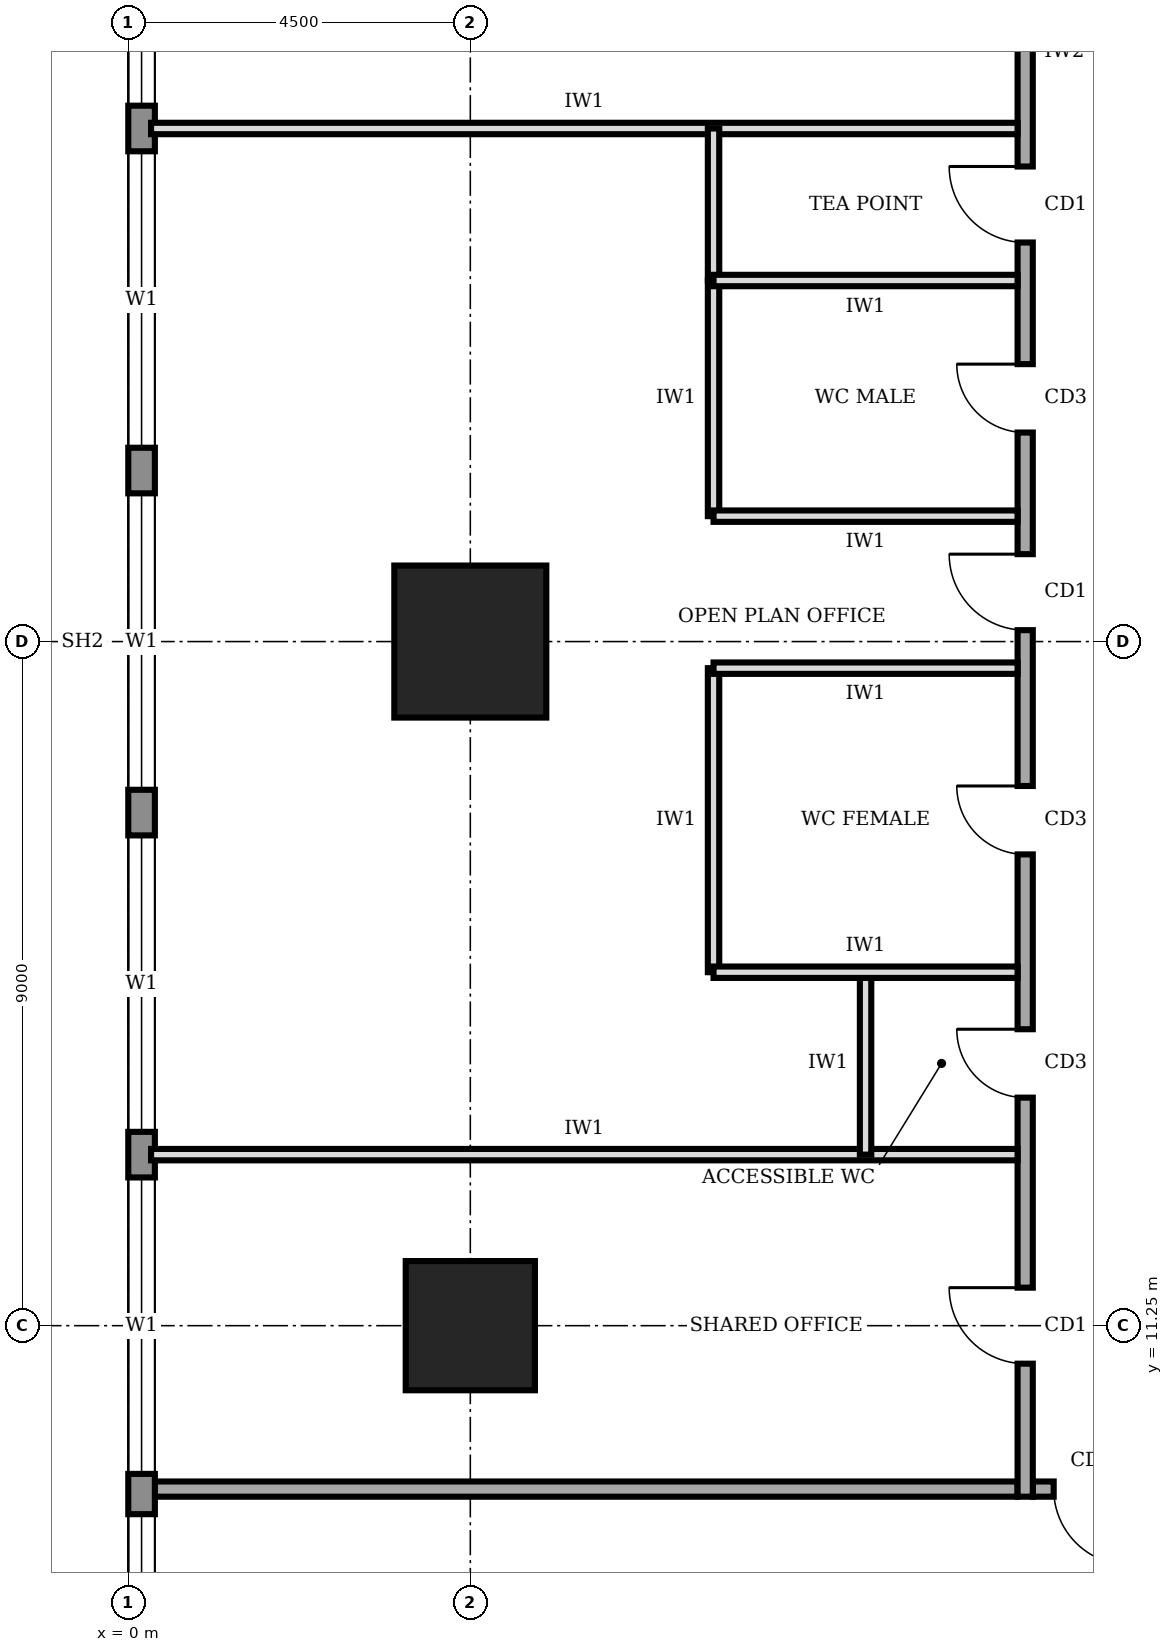
"""IFC4 building model, lengths in metres.
Left out: names, types, materials, properties, quantities, classifications, styles, units other than length and angle.
Written with IfcOpenShell. Run it as: python <this file> out.ifc"""

import sys

from ifc_helpers import new_model, si_unit, direction, frame, frame_2d, origin, origin_2d, place, context, subcontext, project, spatial, rectangle, extrude, element, fill, save


model = new_model("IFC4")
c1 = context("Model", 3, precision=1e-05, world=origin(), true_north=direction((0.0, 1.0)))
c2 = subcontext(c1, "Body", "Model", "MODEL_VIEW")
j1 = project(units=[si_unit("LENGTHUNIT", "METRE"), si_unit("PLANEANGLEUNIT", "RADIAN")], contexts=[c1])
p1 = place(None, origin())
s1 = spatial("IfcSite", under=j1, at=p1, CompositionType="ELEMENT")
p2 = place(p1, origin())
s2 = spatial("IfcBuilding", under=s1, at=p2, CompositionType="ELEMENT")
p3 = place(p2, frame((0.0, 0.0, 277.0)))
s3 = spatial("IfcBuildingStorey", under=s2, at=p3, CompositionType="ELEMENT", Elevation=277.0)
p4 = place(p3, frame((4.5, 11.25, 0.0), z_axis=(0.0, 0.0, 1.0), x_axis=(1.0, 0.0, 0.0)))
e1 = element("IfcColumn", 1, at=p4, inside=s3, PredefinedType="COLUMN", context=c2, shape_type="SweptSolid", body=[
    extrude(rectangle(XDim=1.7, YDim=1.7, at=origin_2d()), origin(), (0.0, 0.0, 1.0), 4.0),
])
p5 = place(p3, frame((4.5, 20.25, 0.0), z_axis=(0.0, 0.0, 1.0), x_axis=(1.0, 0.0, 0.0)))
e2 = element("IfcColumn", 2, at=p5, inside=s3, PredefinedType="COLUMN", context=c2, shape_type="SweptSolid", body=[
    extrude(rectangle(XDim=2.0, YDim=2.0, at=origin_2d()), origin(), (0.0, 0.0, 1.0), 4.0),
])
p6 = place(p3, frame((0.175, 35.98, 0.0), z_axis=(0.0, 0.0, 1.0), x_axis=(0.0, -1.0, 0.0)))
e3 = element("IfcWall", 3, at=p6, inside=s3, PredefinedType="STANDARD", context=c2, shape_type="SweptSolid", body=[
    extrude(rectangle(XDim=31.46, YDim=0.35, at=frame_2d((15.73, 0.0))), origin(), (0.0, 0.0, 1.0), 3.75),
])
p7 = place(p6, frame((27.21, 0.0, 0.9)))
e4 = element("IfcOpeningElement", 4, at=p7, cuts=e3, PredefinedType="OPENING", context=c2, shape_type="SweptSolid", body=[
    extrude(rectangle(XDim=3.9, YDim=2.2, at=frame_2d((1.95, 1.1))), frame((0.0, 0.185, 0.0), z_axis=(0.0, -1.0, 0.0), x_axis=(1.0, 0.0, 0.0)), (0.0, 0.0, 1.0), 0.37),
])
p8 = place(p6, frame((22.78, 0.0, 0.9)))
e5 = element("IfcOpeningElement", 5, at=p8, cuts=e3, PredefinedType="OPENING", context=c2, shape_type="SweptSolid", body=[
    extrude(rectangle(XDim=3.9, YDim=2.2, at=frame_2d((1.95, 1.1))), frame((0.0, 0.185, 0.0), z_axis=(0.0, -1.0, 0.0), x_axis=(1.0, 0.0, 0.0)), (0.0, 0.0, 1.0), 0.37),
])
p9 = place(p6, frame((18.28, 0.0, 0.9)))
e6 = element("IfcOpeningElement", 6, at=p9, cuts=e3, PredefinedType="OPENING", context=c2, shape_type="SweptSolid", body=[
    extrude(rectangle(XDim=3.9, YDim=2.2, at=frame_2d((1.95, 1.1))), frame((0.0, 0.185, 0.0), z_axis=(0.0, -1.0, 0.0), x_axis=(1.0, 0.0, 0.0)), (0.0, 0.0, 1.0), 0.37),
])
p10 = place(p6, frame((13.78, 0.0, 0.9)))
e7 = element("IfcOpeningElement", 7, at=p10, cuts=e3, PredefinedType="OPENING", context=c2, shape_type="SweptSolid", body=[
    extrude(rectangle(XDim=3.9, YDim=2.2, at=frame_2d((1.95, 1.1))), frame((0.0, 0.185, 0.0), z_axis=(0.0, -1.0, 0.0), x_axis=(1.0, 0.0, 0.0)), (0.0, 0.0, 1.0), 0.37),
])
p11 = place(p6, frame((9.28, 0.0, 0.9)))
e8 = element("IfcOpeningElement", 8, at=p11, cuts=e3, PredefinedType="OPENING", context=c2, shape_type="SweptSolid", body=[
    extrude(rectangle(XDim=3.9, YDim=2.2, at=frame_2d((1.95, 1.1))), frame((0.0, 0.185, 0.0), z_axis=(0.0, -1.0, 0.0), x_axis=(1.0, 0.0, 0.0)), (0.0, 0.0, 1.0), 0.37),
])
p12 = place(p6, frame((4.78, 0.0, 0.9)))
e9 = element("IfcOpeningElement", 9, at=p12, cuts=e3, PredefinedType="OPENING", context=c2, shape_type="SweptSolid", body=[
    extrude(rectangle(XDim=3.9, YDim=2.2, at=frame_2d((1.95, 1.1))), frame((0.0, 0.185, 0.0), z_axis=(0.0, -1.0, 0.0), x_axis=(1.0, 0.0, 0.0)), (0.0, 0.0, 1.0), 0.37),
])
p13 = place(p3, frame((11.9, 9.1, 0.0), z_axis=(0.0, 0.0, 1.0), x_axis=(1.0, 0.0, 0.0)))
e10 = element("IfcWall", 10, at=p13, inside=s3, PredefinedType="SOLIDWALL", context=c2, shape_type="SweptSolid", body=[
    extrude(rectangle(XDim=16.9, YDim=0.2, at=frame_2d((8.45, 0.0))), origin(), (0.0, 0.0, 1.0), 3.75),
])
p14 = place(p13, frame((0.275, 0.0, 0.0)))
e11 = element("IfcOpeningElement", 11, at=p14, cuts=e10, PredefinedType="OPENING", context=c2, shape_type="SweptSolid", body=[
    extrude(rectangle(XDim=1.0, YDim=2.1, at=frame_2d((0.5, 1.05))), frame((0.0, 0.11, 0.0), z_axis=(0.0, -1.0, 0.0), x_axis=(1.0, 0.0, 0.0)), (0.0, 0.0, 1.0), 0.22),
])
p15 = place(p13, frame((8.35, 0.0, 0.0)))
e12 = element("IfcOpeningElement", 12, at=p15, cuts=e10, PredefinedType="OPENING", context=c2, shape_type="SweptSolid", body=[
    extrude(rectangle(XDim=1.8, YDim=2.1, at=frame_2d((0.9, 1.05))), frame((0.0, 0.11, 0.0), z_axis=(0.0, -1.0, 0.0), x_axis=(1.0, 0.0, 0.0)), (0.0, 0.0, 1.0), 0.22),
])
p16 = place(p3, frame((11.8, 32.8, 0.0), z_axis=(0.0, 0.0, 1.0), x_axis=(0.0, -1.0, 0.0)))
e13 = element("IfcWall", 13, at=p16, inside=s3, PredefinedType="SOLIDWALL", context=c2, shape_type="SweptSolid", body=[
    extrude(rectangle(XDim=23.8, YDim=0.2, at=frame_2d((11.9, 0.0))), origin(), (0.0, 0.0, 1.0), 3.75),
])
p17 = place(p16, frame((21.05, 0.0, 0.0)))
e14 = element("IfcOpeningElement", 14, at=p17, cuts=e13, PredefinedType="OPENING", context=c2, shape_type="SweptSolid", body=[
    extrude(rectangle(XDim=1.0, YDim=2.1, at=frame_2d((0.5, 1.05))), frame((0.0, 0.11, 0.0), z_axis=(0.0, -1.0, 0.0), x_axis=(1.0, 0.0, 0.0)), (0.0, 0.0, 1.0), 0.22),
])
p18 = place(p16, frame((17.65, 0.0, 0.0)))
e15 = element("IfcOpeningElement", 15, at=p18, cuts=e13, PredefinedType="OPENING", context=c2, shape_type="SweptSolid", body=[
    extrude(rectangle(XDim=0.9, YDim=2.1, at=frame_2d((0.45, 1.05))), frame((0.0, 0.11, 0.0), z_axis=(0.0, -1.0, 0.0), x_axis=(1.0, 0.0, 0.0)), (0.0, 0.0, 1.0), 0.22),
])
p19 = place(p16, frame((14.45, 0.0, 0.0)))
e16 = element("IfcOpeningElement", 16, at=p19, cuts=e13, PredefinedType="OPENING", context=c2, shape_type="SweptSolid", body=[
    extrude(rectangle(XDim=0.9, YDim=2.1, at=frame_2d((0.45, 1.05))), frame((0.0, 0.11, 0.0), z_axis=(0.0, -1.0, 0.0), x_axis=(1.0, 0.0, 0.0)), (0.0, 0.0, 1.0), 0.22),
])
p20 = place(p16, frame((8.9, 0.0, 0.0)))
e17 = element("IfcOpeningElement", 17, at=p20, cuts=e13, PredefinedType="OPENING", context=c2, shape_type="SweptSolid", body=[
    extrude(rectangle(XDim=0.9, YDim=2.1, at=frame_2d((0.45, 1.05))), frame((0.0, 0.11, 0.0), z_axis=(0.0, -1.0, 0.0), x_axis=(1.0, 0.0, 0.0)), (0.0, 0.0, 1.0), 0.22),
])
p21 = place(p16, frame((6.3, 0.0, 0.0)))
e18 = element("IfcOpeningElement", 18, at=p21, cuts=e13, PredefinedType="OPENING", context=c2, shape_type="SweptSolid", body=[
    extrude(rectangle(XDim=1.0, YDim=2.1, at=frame_2d((0.5, 1.05))), frame((0.0, 0.11, 0.0), z_axis=(0.0, -1.0, 0.0), x_axis=(1.0, 0.0, 0.0)), (0.0, 0.0, 1.0), 0.22),
])
p22 = place(p16, frame((11.4, 0.0, 0.0)))
e19 = element("IfcOpeningElement", 19, at=p22, cuts=e13, PredefinedType="OPENING", context=c2, shape_type="SweptSolid", body=[
    extrude(rectangle(XDim=1.0, YDim=2.1, at=frame_2d((0.5, 1.05))), frame((0.0, 0.11, 0.0), z_axis=(0.0, -1.0, 0.0), x_axis=(1.0, 0.0, 0.0)), (0.0, 0.0, 1.0), 0.22),
])
p23 = place(p16, frame((2.3, 0.0, 0.0)))
e20 = element("IfcOpeningElement", 20, at=p23, cuts=e13, PredefinedType="OPENING", context=c2, shape_type="SweptSolid", body=[
    extrude(rectangle(XDim=1.0, YDim=2.1, at=frame_2d((0.5, 1.05))), frame((0.0, 0.11, 0.0), z_axis=(0.0, -1.0, 0.0), x_axis=(1.0, 0.0, 0.0)), (0.0, 0.0, 1.0), 0.22),
])
p24 = place(p3, frame((0.3, 9.1, 0.0), z_axis=(0.0, 0.0, 1.0), x_axis=(1.0, 0.0, 0.0)))
e21 = element("IfcWall", 21, at=p24, inside=s3, PredefinedType="SOLIDWALL", context=c2, shape_type="SweptSolid", body=[
    extrude(rectangle(XDim=11.4, YDim=0.2, at=frame_2d((5.7, 0.0))), origin(), (0.0, 0.0, 1.0), 3.75),
])
for number, where, z_axis, x_axis in (
    (22, (0.3, 13.5, 0.0), (0.0, 0.0, 1.0), (1.0, 0.0, 0.0)),
    (23, (0.3, 27.0, 0.0), (0.0, 0.0, 1.0), (1.0, 0.0, 0.0)),
):
    element("IfcWall", number, at=place(p3, frame(where, z_axis=z_axis, x_axis=x_axis)), inside=s3, PredefinedType="PARTITIONING", context=c2, shape_type="SweptSolid", body=[
        extrude(rectangle(XDim=11.4, YDim=0.15, at=frame_2d((5.7, 0.0))), origin(), (0.0, 0.0, 1.0), 3.75),
    ])
p25 = place(p3, frame((11.7, 15.9, 0.0), z_axis=(0.0, 0.0, 1.0), x_axis=(-1.0, 0.0, 0.0)))
e24 = element("IfcWall", 24, at=p25, inside=s3, PredefinedType="PARTITIONING", context=c2, shape_type="SweptSolid", body=[
    extrude(rectangle(XDim=4.0, YDim=0.15, at=frame_2d((2.0, 0.0))), origin(), (0.0, 0.0, 1.0), 3.75),
])
p26 = place(p3, frame((11.7, 19.9, 0.0), z_axis=(0.0, 0.0, 1.0), x_axis=(-1.0, 0.0, 0.0)))
e25 = element("IfcWall", 25, at=p26, inside=s3, PredefinedType="PARTITIONING", context=c2, shape_type="SweptSolid", body=[
    extrude(rectangle(XDim=4.0, YDim=0.15, at=frame_2d((2.0, 0.0))), origin(), (0.0, 0.0, 1.0), 2.85),
])
for number, where, z_axis, x_axis in (
    (26, (11.7, 21.9, 0.0), (0.0, 0.0, 1.0), (-1.0, 0.0, 0.0)),
    (27, (11.7, 25.0, 0.0), (0.0, 0.0, 1.0), (-1.0, 0.0, 0.0)),
):
    element("IfcWall", number, at=place(p3, frame(where, z_axis=z_axis, x_axis=x_axis)), inside=s3, PredefinedType="PARTITIONING", context=c2, shape_type="SweptSolid", body=[
        extrude(rectangle(XDim=4.0, YDim=0.15, at=frame_2d((2.0, 0.0))), origin(), (0.0, 0.0, 1.0), 3.75),
    ])
p27 = place(p3, frame((9.7, 13.5, 0.0), z_axis=(0.0, 0.0, 1.0), x_axis=(0.0, 1.0, 0.0)))
e28 = element("IfcWall", 28, at=p27, inside=s3, PredefinedType="PARTITIONING", context=c2, shape_type="SweptSolid", body=[
    extrude(rectangle(XDim=2.4, YDim=0.15, at=frame_2d((1.2, 0.0))), origin(), (0.0, 0.0, 1.0), 3.75),
])
p28 = place(p3, frame((7.7, 15.9, 0.0), z_axis=(0.0, 0.0, 1.0), x_axis=(0.0, 1.0, 0.0)))
e29 = element("IfcWall", 29, at=p28, inside=s3, PredefinedType="PARTITIONING", context=c2, shape_type="SweptSolid", body=[
    extrude(rectangle(XDim=4.0, YDim=0.15, at=frame_2d((2.0, 0.0))), origin(), (0.0, 0.0, 1.0), 3.75),
])
p29 = place(p3, frame((7.7, 21.9, 0.0), z_axis=(0.0, 0.0, 1.0), x_axis=(0.0, 1.0, 0.0)))
e30 = element("IfcWall", 30, at=p29, inside=s3, PredefinedType="PARTITIONING", context=c2, shape_type="SweptSolid", body=[
    extrude(rectangle(XDim=3.1, YDim=0.15, at=frame_2d((1.55, 0.0))), origin(), (0.0, 0.0, 1.0), 3.75),
])
p30 = place(p3, frame((7.7, 25.0, 0.0), z_axis=(0.0, 0.0, 1.0), x_axis=(0.0, 1.0, 0.0)))
e31 = element("IfcWall", 31, at=p30, inside=s3, PredefinedType="PARTITIONING", context=c2, shape_type="SweptSolid", body=[
    extrude(rectangle(XDim=2.0, YDim=0.15, at=frame_2d((1.0, 0.0))), origin(), (0.0, 0.0, 1.0), 3.75),
])
p31 = place(p7, origin())
e32 = element("IfcWindow", 32, at=p31, inside=s3, PartitioningType="SINGLE_PANEL", PredefinedType="WINDOW", context=c2, shape_type="SweptSolid", body=[
    extrude(rectangle(XDim=3.9, YDim=2.2, at=frame_2d((1.95, 1.1))), frame((0.0, 0.03, 0.0), z_axis=(0.0, -1.0, 0.0), x_axis=(1.0, 0.0, 0.0)), (0.0, 0.0, 1.0), 0.06),
])
fill(e4, e32)
p32 = place(p8, origin())
e33 = element("IfcWindow", 33, at=p32, inside=s3, PartitioningType="SINGLE_PANEL", PredefinedType="WINDOW", context=c2, shape_type="SweptSolid", body=[
    extrude(rectangle(XDim=3.9, YDim=2.2, at=frame_2d((1.95, 1.1))), frame((0.0, 0.03, 0.0), z_axis=(0.0, -1.0, 0.0), x_axis=(1.0, 0.0, 0.0)), (0.0, 0.0, 1.0), 0.06),
])
fill(e5, e33)
p33 = place(p9, origin())
e34 = element("IfcWindow", 34, at=p33, inside=s3, PartitioningType="SINGLE_PANEL", PredefinedType="WINDOW", context=c2, shape_type="SweptSolid", body=[
    extrude(rectangle(XDim=3.9, YDim=2.2, at=frame_2d((1.95, 1.1))), frame((0.0, 0.03, 0.0), z_axis=(0.0, -1.0, 0.0), x_axis=(1.0, 0.0, 0.0)), (0.0, 0.0, 1.0), 0.06),
])
fill(e6, e34)
p34 = place(p10, origin())
e35 = element("IfcWindow", 35, at=p34, inside=s3, PartitioningType="SINGLE_PANEL", PredefinedType="WINDOW", context=c2, shape_type="SweptSolid", body=[
    extrude(rectangle(XDim=3.9, YDim=2.2, at=frame_2d((1.95, 1.1))), frame((0.0, 0.03, 0.0), z_axis=(0.0, -1.0, 0.0), x_axis=(1.0, 0.0, 0.0)), (0.0, 0.0, 1.0), 0.06),
])
fill(e7, e35)
p35 = place(p11, origin())
e36 = element("IfcWindow", 36, at=p35, inside=s3, PartitioningType="SINGLE_PANEL", PredefinedType="WINDOW", context=c2, shape_type="SweptSolid", body=[
    extrude(rectangle(XDim=3.9, YDim=2.2, at=frame_2d((1.95, 1.1))), frame((0.0, 0.03, 0.0), z_axis=(0.0, -1.0, 0.0), x_axis=(1.0, 0.0, 0.0)), (0.0, 0.0, 1.0), 0.06),
])
fill(e8, e36)
p36 = place(p12, origin())
e37 = element("IfcWindow", 37, at=p36, inside=s3, PartitioningType="SINGLE_PANEL", PredefinedType="WINDOW", context=c2, shape_type="SweptSolid", body=[
    extrude(rectangle(XDim=3.9, YDim=2.2, at=frame_2d((1.95, 1.1))), frame((0.0, 0.03, 0.0), z_axis=(0.0, -1.0, 0.0), x_axis=(1.0, 0.0, 0.0)), (0.0, 0.0, 1.0), 0.06),
])
fill(e9, e37)
p37 = place(p14, frame((1.0, 0.0, 0.0), z_axis=(0.0, 0.0, 1.0), x_axis=(-1.0, 0.0, 0.0)))
e38 = element("IfcDoor", 38, at=p37, inside=s3, OperationType="SINGLE_SWING_LEFT", PredefinedType="DOOR", context=c2, shape_type="SweptSolid", body=[
    extrude(rectangle(XDim=1.0, YDim=2.1, at=frame_2d((0.5, 1.05))), frame((0.0, 0.025, 0.0), z_axis=(0.0, -1.0, 0.0), x_axis=(1.0, 0.0, 0.0)), (0.0, 0.0, 1.0), 0.05),
])
fill(e11, e38)
p38 = place(p17, frame((1.0, 0.0, 0.0), z_axis=(0.0, 0.0, 1.0), x_axis=(-1.0, 0.0, 0.0)))
e39 = element("IfcDoor", 39, at=p38, inside=s3, OperationType="SINGLE_SWING_RIGHT", PredefinedType="DOOR", context=c2, shape_type="SweptSolid", body=[
    extrude(rectangle(XDim=1.0, YDim=2.1, at=frame_2d((0.5, 1.05))), frame((0.0, 0.025, 0.0), z_axis=(0.0, -1.0, 0.0), x_axis=(1.0, 0.0, 0.0)), (0.0, 0.0, 1.0), 0.05),
])
fill(e14, e39)
p39 = place(p18, frame((0.9, 0.0, 0.0), z_axis=(0.0, 0.0, 1.0), x_axis=(-1.0, 0.0, 0.0)))
e40 = element("IfcDoor", 40, at=p39, inside=s3, OperationType="SINGLE_SWING_RIGHT", PredefinedType="DOOR", context=c2, shape_type="SweptSolid", body=[
    extrude(rectangle(XDim=0.9, YDim=2.1, at=frame_2d((0.45, 1.05))), frame((0.0, 0.025, 0.0), z_axis=(0.0, -1.0, 0.0), x_axis=(1.0, 0.0, 0.0)), (0.0, 0.0, 1.0), 0.05),
])
fill(e15, e40)
p40 = place(p19, frame((0.9, 0.0, 0.0), z_axis=(0.0, 0.0, 1.0), x_axis=(-1.0, 0.0, 0.0)))
e41 = element("IfcDoor", 41, at=p40, inside=s3, OperationType="SINGLE_SWING_RIGHT", PredefinedType="DOOR", context=c2, shape_type="SweptSolid", body=[
    extrude(rectangle(XDim=0.9, YDim=2.1, at=frame_2d((0.45, 1.05))), frame((0.0, 0.025, 0.0), z_axis=(0.0, -1.0, 0.0), x_axis=(1.0, 0.0, 0.0)), (0.0, 0.0, 1.0), 0.05),
])
fill(e16, e41)
p41 = place(p20, frame((0.9, 0.0, 0.0), z_axis=(0.0, 0.0, 1.0), x_axis=(-1.0, 0.0, 0.0)))
e42 = element("IfcDoor", 42, at=p41, inside=s3, OperationType="SINGLE_SWING_RIGHT", PredefinedType="DOOR", context=c2, shape_type="SweptSolid", body=[
    extrude(rectangle(XDim=0.9, YDim=2.1, at=frame_2d((0.45, 1.05))), frame((0.0, 0.025, 0.0), z_axis=(0.0, -1.0, 0.0), x_axis=(1.0, 0.0, 0.0)), (0.0, 0.0, 1.0), 0.05),
])
fill(e17, e42)
p42 = place(p21, frame((1.0, 0.0, 0.0), z_axis=(0.0, 0.0, 1.0), x_axis=(-1.0, 0.0, 0.0)))
e43 = element("IfcDoor", 43, at=p42, inside=s3, OperationType="SINGLE_SWING_RIGHT", PredefinedType="DOOR", context=c2, shape_type="SweptSolid", body=[
    extrude(rectangle(XDim=1.0, YDim=2.1, at=frame_2d((0.5, 1.05))), frame((0.0, 0.025, 0.0), z_axis=(0.0, -1.0, 0.0), x_axis=(1.0, 0.0, 0.0)), (0.0, 0.0, 1.0), 0.05),
])
fill(e18, e43)
p43 = place(p22, frame((1.0, 0.0, 0.0), z_axis=(0.0, 0.0, 1.0), x_axis=(-1.0, 0.0, 0.0)))
e44 = element("IfcDoor", 44, at=p43, inside=s3, OperationType="SINGLE_SWING_RIGHT", PredefinedType="DOOR", context=c2, shape_type="SweptSolid", body=[
    extrude(rectangle(XDim=1.0, YDim=2.1, at=frame_2d((0.5, 1.05))), frame((0.0, 0.025, 0.0), z_axis=(0.0, -1.0, 0.0), x_axis=(1.0, 0.0, 0.0)), (0.0, 0.0, 1.0), 0.05),
])
fill(e19, e44)
save(model, sys.argv[1])
